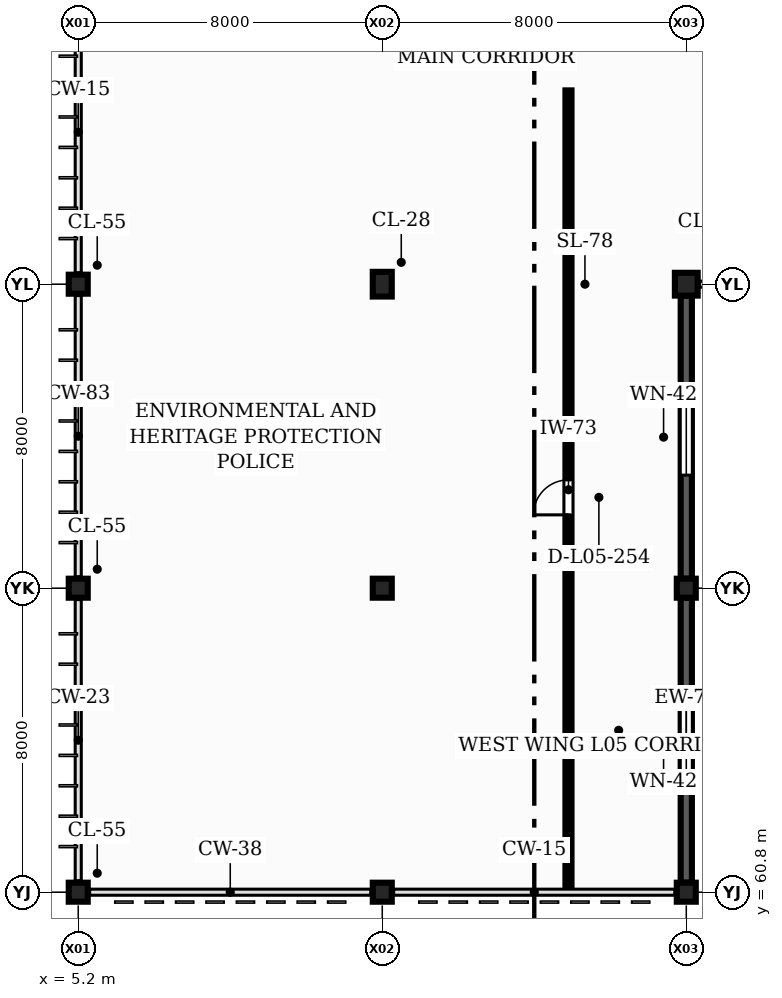
"""IFC4 building model, lengths in metres.
Left out: names, types, materials, properties, quantities, classifications, styles, units other than length and angle.
Written with IfcOpenShell. Run it as: python <this file> out.ifc"""

import sys

from ifc_helpers import new_model, si_unit, direction, frame, frame_2d, origin, origin_2d, place, context, subcontext, project, spatial, rectangle, extrude, element, fill, save


model = new_model("IFC4")
c1 = context("Model", 3, precision=1e-05, world=origin(), true_north=direction((0.0, 1.0)))
c2 = subcontext(c1, "Body", "Model", "MODEL_VIEW")
j1 = project(units=[si_unit("LENGTHUNIT", "METRE"), si_unit("PLANEANGLEUNIT", "RADIAN")], contexts=[c1])
p1 = place(None, origin())
s1 = spatial("IfcSite", under=j1, at=p1, CompositionType="ELEMENT")
p2 = place(p1, origin())
s2 = spatial("IfcBuilding", under=s1, at=p2, CompositionType="ELEMENT")
p3 = place(p2, frame((0.0, 0.0, 21.9)))
s3 = spatial("IfcBuildingStorey", under=s2, at=p3, CompositionType="ELEMENT", Elevation=21.9)
for number, where, z_axis, x_axis in (
    (1, (5.2, 60.8, 0.0), (0.0, 0.0, 1.0), (1.0, 0.0, 0.0)),
    (2, (5.2, 68.8, 0.0), (0.0, 0.0, 1.0), (1.0, 0.0, 0.0)),
    (3, (5.2, 76.8, 0.0), (0.0, 0.0, 1.0), (1.0, 0.0, 0.0)),
    (4, (13.2, 60.8, 0.0), (0.0, 0.0, 1.0), (1.0, 0.0, 0.0)),
    (5, (13.2, 68.8, 0.0), (0.0, 0.0, 1.0), (1.0, 0.0, 0.0)),
):
    element("IfcColumn", number, at=place(p3, frame(where, z_axis=z_axis, x_axis=x_axis)), inside=s3, PredefinedType="COLUMN", context=c2, shape_type="SweptSolid", body=[
        extrude(rectangle(XDim=0.5, YDim=0.5, at=origin_2d()), origin(), (0.0, 0.0, 1.0), 3.9),
    ])
p4 = place(p3, frame((13.2, 76.8, 0.0), z_axis=(0.0, 0.0, 1.0), x_axis=(1.0, 0.0, 0.0)))
e6 = element("IfcColumn", 6, at=p4, inside=s3, PredefinedType="COLUMN", context=c2, shape_type="SweptSolid", body=[
    extrude(rectangle(XDim=0.5, YDim=0.65, at=origin_2d()), origin(), (0.0, 0.0, 1.0), 3.9),
])
for number, where, z_axis, x_axis in (
    (7, (21.2, 60.8, 0.0), (0.0, 0.0, 1.0), (1.0, 0.0, 0.0)),
    (8, (21.2, 68.8, 0.0), (0.0, 0.0, 1.0), (1.0, 0.0, 0.0)),
):
    element("IfcColumn", number, at=place(p3, frame(where, z_axis=z_axis, x_axis=x_axis)), inside=s3, PredefinedType="COLUMN", context=c2, shape_type="SweptSolid", body=[
        extrude(rectangle(XDim=0.5, YDim=0.5, at=origin_2d()), origin(), (0.0, 0.0, 1.0), 3.9),
    ])
p5 = place(p3, frame((21.2, 76.8, 0.0), z_axis=(0.0, 0.0, 1.0), x_axis=(1.0, 0.0, 0.0)))
e9 = element("IfcColumn", 9, at=p5, inside=s3, PredefinedType="COLUMN", context=c2, shape_type="SweptSolid", body=[
    extrude(rectangle(XDim=0.6, YDim=0.6, at=origin_2d()), origin(), (0.0, 0.0, 1.0), 3.9),
])
p6 = place(p3, frame((21.2, 61.05, 0.0), z_axis=(0.0, 0.0, 1.0), x_axis=(0.0, 1.0, 0.0)))
e10 = element("IfcWall", 10, at=p6, inside=s3, PredefinedType="SOLIDWALL", context=c2, shape_type="SweptSolid", body=[
    extrude(rectangle(XDim=7.5, YDim=0.295, at=frame_2d((3.75, 0.0))), origin(), (0.0, 0.0, 1.0), 3.0),
])
p7 = place(p6, frame((2.75, 0.0, 0.9)))
e11 = element("IfcOpeningElement", 11, at=p7, cuts=e10, PredefinedType="OPENING", context=c2, shape_type="SweptSolid", body=[
    extrude(rectangle(XDim=2.0, YDim=1.5, at=frame_2d((1.0, 0.75))), frame((0.0, 0.157, 0.0), z_axis=(0.0, -1.0, 0.0), x_axis=(1.0, 0.0, 0.0)), (0.0, 0.0, 1.0), 0.315),
])
p8 = place(p3, frame((21.2, 69.05, 0.0), z_axis=(0.0, 0.0, 1.0), x_axis=(0.0, 1.0, 0.0)))
e12 = element("IfcWall", 12, at=p8, inside=s3, PredefinedType="SOLIDWALL", context=c2, shape_type="SweptSolid", body=[
    extrude(rectangle(XDim=7.45, YDim=0.295, at=frame_2d((3.725, 0.0))), origin(), (0.0, 0.0, 1.0), 3.0),
])
p9 = place(p8, frame((2.725, 0.0, 0.9)))
e13 = element("IfcOpeningElement", 13, at=p9, cuts=e12, PredefinedType="OPENING", context=c2, shape_type="SweptSolid", body=[
    extrude(rectangle(XDim=2.0, YDim=1.5, at=frame_2d((1.0, 0.75))), frame((0.0, 0.157, 0.0), z_axis=(0.0, -1.0, 0.0), x_axis=(1.0, 0.0, 0.0)), (0.0, 0.0, 1.0), 0.315),
])
p10 = place(p3, frame((18.1, 60.88, 0.0), z_axis=(0.0, 0.0, 1.0), x_axis=(0.0, 1.0, 0.0)))
e14 = element("IfcWall", 14, at=p10, inside=s3, PredefinedType="PARTITIONING", context=c2, shape_type="SweptSolid", body=[
    extrude(rectangle(XDim=21.02, YDim=0.16, at=frame_2d((10.51, 0.0))), origin(), (0.0, 0.0, 1.0), 2.935),
])
p11 = place(p10, frame((9.85, 0.0, 0.0)))
e15 = element("IfcOpeningElement", 15, at=p11, cuts=e14, PredefinedType="OPENING", context=c2, shape_type="SweptSolid", body=[
    extrude(rectangle(XDim=0.92, YDim=2.1, at=frame_2d((0.46, 1.05))), frame((0.0, 0.09, 0.0), z_axis=(0.0, -1.0, 0.0), x_axis=(1.0, 0.0, 0.0)), (0.0, 0.0, 1.0), 0.18),
])
p12 = place(p7, origin())
e16 = element("IfcWindow", 16, at=p12, inside=s3, PartitioningType="SINGLE_PANEL", PredefinedType="WINDOW", context=c2, shape_type="SweptSolid", body=[
    extrude(rectangle(XDim=2.0, YDim=1.5, at=frame_2d((1.0, 0.75))), frame((0.0, 0.03, 0.0), z_axis=(0.0, -1.0, 0.0), x_axis=(1.0, 0.0, 0.0)), (0.0, 0.0, 1.0), 0.06),
])
fill(e11, e16)
p13 = place(p9, origin())
e17 = element("IfcWindow", 17, at=p13, inside=s3, PartitioningType="SINGLE_PANEL", PredefinedType="WINDOW", context=c2, shape_type="SweptSolid", body=[
    extrude(rectangle(XDim=2.0, YDim=1.5, at=frame_2d((1.0, 0.75))), frame((0.0, 0.03, 0.0), z_axis=(0.0, -1.0, 0.0), x_axis=(1.0, 0.0, 0.0)), (0.0, 0.0, 1.0), 0.06),
])
fill(e13, e17)
p14 = place(p11, origin())
e18 = element("IfcDoor", 18, at=p14, inside=s3, OperationType="SINGLE_SWING_LEFT", PredefinedType="DOOR", context=c2, shape_type="SweptSolid", body=[
    extrude(rectangle(XDim=0.92, YDim=2.1, at=frame_2d((0.46, 1.05))), frame((0.0, 0.025, 0.0), z_axis=(0.0, -1.0, 0.0), x_axis=(1.0, 0.0, 0.0)), (0.0, 0.0, 1.0), 0.05),
])
fill(e15, e18)
save(model, sys.argv[1])
